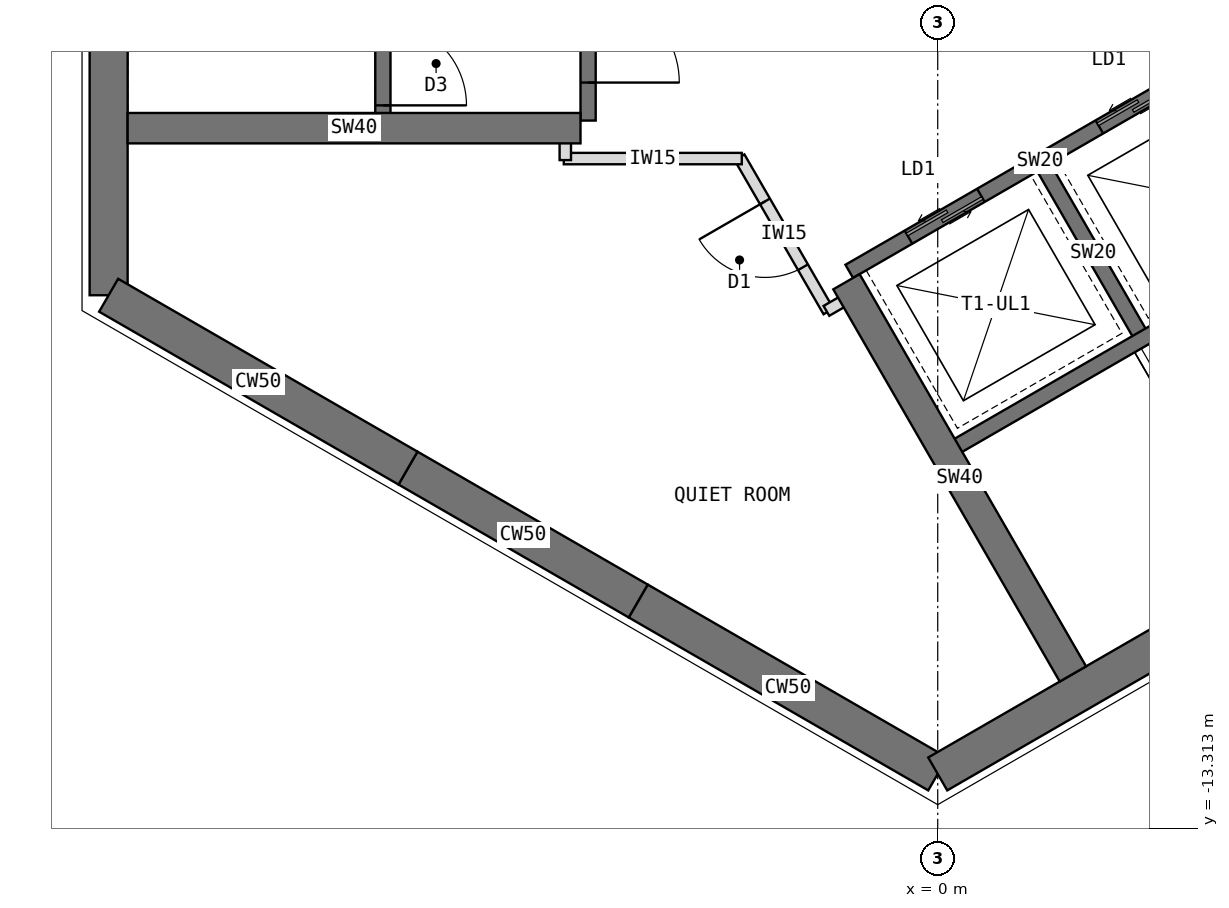
"""IFC4 building model, lengths in metres.
Left out: names, types, materials, properties, quantities, classifications, styles, units other than length and angle.
Written with IfcOpenShell. Run it as: python <this file> out.ifc"""

import sys

from ifc_helpers import new_model, si_unit, direction, frame, frame_2d, origin, place, context, subcontext, project, spatial, rectangle, extrude, element, fill, save


model = new_model("IFC4")
c1 = context("Model", 3, precision=1e-05, world=origin(), true_north=direction((0.0, 1.0)))
c2 = subcontext(c1, "Body", "Model", "MODEL_VIEW")
j1 = project(units=[si_unit("LENGTHUNIT", "METRE"), si_unit("PLANEANGLEUNIT", "RADIAN")], contexts=[c1])
p1 = place(None, origin())
s1 = spatial("IfcSite", under=j1, at=p1, CompositionType="ELEMENT")
p2 = place(p1, origin())
s2 = spatial("IfcBuilding", under=s1, at=p2, CompositionType="ELEMENT")
p3 = place(p2, frame((0.0, 0.0, 234.5)))
s3 = spatial("IfcBuildingStorey", under=s2, at=p3, CompositionType="ELEMENT", Elevation=234.5)
p4 = place(p3, frame((-10.908, 6.298, 0.0), z_axis=(0.0, 0.0, 1.0), x_axis=(0.0, -1.0, 0.0)))
e1 = element("IfcWall", 1, at=p4, inside=s3, PredefinedType="SHEAR", context=c2, shape_type="SweptSolid", body=[
    extrude(rectangle(XDim=12.596, YDim=0.5, at=frame_2d((6.298, 0.0))), origin(), (0.0, 0.0, 1.0), 4.0),
])
p5 = place(p3, frame((-10.908, -6.298, 0.0), z_axis=(0.0, 0.0, 1.0), x_axis=(0.866034513004, -0.499984222037, 0.0)))
e2 = element("IfcWall", 2, at=p5, inside=s3, PredefinedType="SHEAR", context=c2, shape_type="SweptSolid", body=[
    extrude(rectangle(XDim=4.548, YDim=0.5, at=frame_2d((2.274, 0.0))), origin(), (0.0, 0.0, 1.0), 4.0),
])
p6 = place(p3, frame((-6.97, -8.572, 0.0), z_axis=(0.0, 0.0, 1.0), x_axis=(0.866019471182, -0.500010275428, 0.0)))
e3 = element("IfcWall", 3, at=p6, inside=s3, PredefinedType="SHEAR", context=c2, shape_type="SweptSolid", body=[
    extrude(rectangle(XDim=3.5, YDim=0.5, at=frame_2d((1.75, 0.0))), origin(), (0.0, 0.0, 1.0), 4.0),
])
p7 = place(p3, frame((-3.939, -10.322, 0.0), z_axis=(0.0, 0.0, 1.0), x_axis=(0.866011268655, -0.500024481964, 0.0)))
e4 = element("IfcWall", 4, at=p7, inside=s3, PredefinedType="SHEAR", context=c2, shape_type="SweptSolid", body=[
    extrude(rectangle(XDim=4.548, YDim=0.5, at=frame_2d((2.274, 0.0))), origin(), (0.0, 0.0, 1.0), 4.0),
])
p8 = place(p3, frame((0.0, -12.596, 0.0), z_axis=(0.0, 0.0, 1.0), x_axis=(0.866021940709, 0.500005998175, 0.0)))
e5 = element("IfcWall", 5, at=p8, inside=s3, PredefinedType="SHEAR", context=c2, shape_type="SweptSolid", body=[
    extrude(rectangle(XDim=12.596, YDim=0.5, at=frame_2d((6.298, 0.0))), origin(), (0.0, 0.0, 1.0), 4.0),
])
p9 = place(p3, frame((-4.6, 4.0, 0.0), z_axis=(0.0, 0.0, 1.0), x_axis=(0.0, -1.0, 0.0)))
e6 = element("IfcWall", 6, at=p9, inside=s3, PredefinedType="SHEAR", context=c2, shape_type="SweptSolid", body=[
    extrude(rectangle(XDim=8.0, YDim=0.2, at=frame_2d((4.0, 0.0))), origin(), (0.0, 0.0, 1.0), 4.0),
])
p10 = place(p9, frame((6.3, 0.0, 0.0)))
e7 = element("IfcOpeningElement", 7, at=p10, cuts=e6, PredefinedType="OPENING", context=c2, shape_type="SweptSolid", body=[
    extrude(rectangle(XDim=1.2, YDim=2.1, at=frame_2d((0.6, 1.05))), frame((0.0, 0.11, 0.0), z_axis=(0.0, -1.0, 0.0), x_axis=(1.0, 0.0, 0.0)), (0.0, 0.0, 1.0), 0.22),
])
p11 = place(p9, frame((0.9, 0.0, 0.0)))
e8 = element("IfcOpeningElement", 8, at=p11, cuts=e6, PredefinedType="OPENING", context=c2, shape_type="SweptSolid", body=[
    extrude(rectangle(XDim=1.1, YDim=2.2, at=frame_2d((0.55, 1.1))), frame((0.0, 0.11, 0.0), z_axis=(0.0, -1.0, 0.0), x_axis=(1.0, 0.0, 0.0)), (0.0, 0.0, 1.0), 0.22),
])
p12 = place(p3, frame((-7.3, 4.0, 0.0), z_axis=(0.0, 0.0, 1.0), x_axis=(0.0, -1.0, 0.0)))
e9 = element("IfcWall", 9, at=p12, inside=s3, PredefinedType="SHEAR", context=c2, shape_type="SweptSolid", body=[
    extrude(rectangle(XDim=8.0, YDim=0.2, at=frame_2d((4.0, 0.0))), origin(), (0.0, 0.0, 1.0), 4.0),
])
p13 = place(p12, frame((6.7, 0.0, 0.0)))
e10 = element("IfcOpeningElement", 10, at=p13, cuts=e9, PredefinedType="OPENING", context=c2, shape_type="SweptSolid", body=[
    extrude(rectangle(XDim=1.1, YDim=2.1, at=frame_2d((0.55, 1.05))), frame((0.0, 0.11, 0.0), z_axis=(0.0, -1.0, 0.0), x_axis=(1.0, 0.0, 0.0)), (0.0, 0.0, 1.0), 0.22),
])
p14 = place(p3, frame((-4.7, -4.1, 0.0), z_axis=(0.0, 0.0, 1.0), x_axis=(-1.0, 0.0, 0.0)))
e11 = element("IfcWall", 11, at=p14, inside=s3, PredefinedType="SHEAR", context=c2, shape_type="SweptSolid", body=[
    extrude(rectangle(XDim=5.958, YDim=0.4, at=frame_2d((2.979, 0.0))), origin(), (0.0, 0.0, 1.0), 4.0),
])
p15 = place(p3, frame((-1.164, -5.984, 0.0), z_axis=(0.0, 0.0, 1.0), x_axis=(0.866026010844, 0.49999894854, 0.0)))
e12 = element("IfcWall", 12, at=p15, inside=s3, PredefinedType="SHEAR", context=c2, shape_type="SweptSolid", body=[
    extrude(rectangle(XDim=8.0, YDim=0.2, at=frame_2d((4.0, 0.0))), origin(), (0.0, 0.0, 1.0), 4.0),
])
p16 = place(p15, frame((6.3, 0.0, 0.0)))
e13 = element("IfcOpeningElement", 13, at=p16, cuts=e12, PredefinedType="OPENING", context=c2, shape_type="SweptSolid", body=[
    extrude(rectangle(XDim=1.2, YDim=2.1, at=frame_2d((0.6, 1.05))), frame((0.0, 0.11, 0.0), z_axis=(0.0, -1.0, 0.0), x_axis=(1.0, 0.0, 0.0)), (0.0, 0.0, 1.0), 0.22),
])
p17 = place(p15, frame((0.9, 0.0, 0.0)))
e14 = element("IfcOpeningElement", 14, at=p17, cuts=e12, PredefinedType="OPENING", context=c2, shape_type="SweptSolid", body=[
    extrude(rectangle(XDim=1.1, YDim=2.2, at=frame_2d((0.55, 1.1))), frame((0.0, 0.11, 0.0), z_axis=(0.0, -1.0, 0.0), x_axis=(1.0, 0.0, 0.0)), (0.0, 0.0, 1.0), 0.22),
])
p18 = place(p15, frame((3.8, 0.0, 0.0)))
e15 = element("IfcOpeningElement", 15, at=p18, cuts=e12, PredefinedType="OPENING", context=c2, shape_type="SweptSolid", body=[
    extrude(rectangle(XDim=1.1, YDim=2.2, at=frame_2d((0.55, 1.1))), frame((0.0, 0.11, 0.0), z_axis=(0.0, -1.0, 0.0), x_axis=(1.0, 0.0, 0.0)), (0.0, 0.0, 1.0), 0.22),
])
p19 = place(p3, frame((1.397, -4.62, 0.0), z_axis=(0.0, 0.0, 1.0), x_axis=(0.499936506574, -0.866062058628, 0.0)))
e16 = element("IfcWall", 16, at=p19, inside=s3, PredefinedType="SHEAR", context=c2, shape_type="SweptSolid", body=[
    extrude(rectangle(XDim=2.6, YDim=0.2, at=frame_2d((1.3, 0.0))), origin(), (0.0, 0.0, 1.0), 4.0),
])
p20 = place(p3, frame((0.186, -8.322, 0.0), z_axis=(0.0, 0.0, 1.0), x_axis=(0.866026010844, 0.49999894854, 0.0)))
e17 = element("IfcWall", 17, at=p20, inside=s3, PredefinedType="SHEAR", context=c2, shape_type="SweptSolid", body=[
    extrude(rectangle(XDim=8.0, YDim=0.2, at=frame_2d((4.0, 0.0))), origin(), (0.0, 0.0, 1.0), 4.0),
])
p21 = place(p20, frame((6.7, 0.0, 0.0)))
e18 = element("IfcOpeningElement", 18, at=p21, cuts=e17, PredefinedType="OPENING", context=c2, shape_type="SweptSolid", body=[
    extrude(rectangle(XDim=1.1, YDim=2.1, at=frame_2d((0.55, 1.05))), frame((0.0, 0.11, 0.0), z_axis=(0.0, -1.0, 0.0), x_axis=(1.0, 0.0, 0.0)), (0.0, 0.0, 1.0), 0.22),
])
p22 = place(p3, frame((-1.201, -6.12, 0.0), z_axis=(0.0, 0.0, 1.0), x_axis=(0.500021575205, -0.866012946976, 0.0)))
e19 = element("IfcWall", 19, at=p22, inside=s3, PredefinedType="SHEAR", context=c2, shape_type="SweptSolid", body=[
    extrude(rectangle(XDim=5.958, YDim=0.4, at=frame_2d((2.979, 0.0))), origin(), (0.0, 0.0, 1.0), 4.0),
])
p23 = place(p3, frame((-1.437, -6.511, 0.0), z_axis=(0.0, 0.0, 1.0), x_axis=(-0.500074377092, 0.865982457891, 0.0)))
e20 = element("IfcWall", 20, at=p23, inside=s3, PredefinedType="PARTITIONING", context=c2, shape_type="SweptSolid", body=[
    extrude(rectangle(XDim=2.342, YDim=0.15, at=frame_2d((1.171, 0.0))), origin(), (0.0, 0.0, 1.0), 3.7),
])
p24 = place(p23, frame((0.671, 0.0, 0.0)))
e21 = element("IfcOpeningElement", 21, at=p24, cuts=e20, PredefinedType="OPENING", context=c2, shape_type="SweptSolid", body=[
    extrude(rectangle(XDim=1.0, YDim=2.1, at=frame_2d((0.5, 1.05))), frame((0.0, 0.085, 0.0), z_axis=(0.0, -1.0, 0.0), x_axis=(1.0, 0.0, 0.0)), (0.0, 0.0, 1.0), 0.17),
])
p25 = place(p3, frame((-2.578, -4.5, 0.0), z_axis=(0.0, 0.0, 1.0), x_axis=(-1.0, 0.0, 0.0)))
e22 = element("IfcWall", 22, at=p25, inside=s3, PredefinedType="PARTITIONING", context=c2, shape_type="SweptSolid", body=[
    extrude(rectangle(XDim=2.342, YDim=0.15, at=frame_2d((1.171, 0.0))), origin(), (0.0, 0.0, 1.0), 3.7),
])
for number, where, z_axis, x_axis in (
    (23, (-4.9, -4.52, 0.0), (0.0, 0.0, 1.0), (0.0, 1.0, 0.0)),
    (24, (-1.092, -6.289, 0.0), (0.0, 0.0, 1.0), (-0.866, -0.5, 0.0)),
):
    element("IfcWall", number, at=place(p3, frame(where, z_axis=z_axis, x_axis=x_axis)), inside=s3, PredefinedType="PARTITIONING", context=c2, shape_type="SweptSolid", body=[
        extrude(rectangle(XDim=0.43, YDim=0.15, at=frame_2d((0.215, 0.0))), origin(), (0.0, 0.0, 1.0), 3.7),
    ])
p26 = place(p10, origin())
e25 = element("IfcDoor", 25, at=p26, inside=s3, OperationType="SINGLE_SWING_RIGHT", PredefinedType="DOOR", context=c2, shape_type="SweptSolid", body=[
    extrude(rectangle(XDim=1.2, YDim=2.1, at=frame_2d((0.6, 1.05))), frame((0.0, 0.025, 0.0), z_axis=(0.0, -1.0, 0.0), x_axis=(1.0, 0.0, 0.0)), (0.0, 0.0, 1.0), 0.05),
])
fill(e7, e25)
p27 = place(p13, origin())
e26 = element("IfcDoor", 26, at=p27, inside=s3, OperationType="SINGLE_SWING_RIGHT", PredefinedType="DOOR", context=c2, shape_type="SweptSolid", body=[
    extrude(rectangle(XDim=1.1, YDim=2.1, at=frame_2d((0.55, 1.05))), frame((0.0, 0.025, 0.0), z_axis=(0.0, -1.0, 0.0), x_axis=(1.0, 0.0, 0.0)), (0.0, 0.0, 1.0), 0.05),
])
fill(e10, e26)
p28 = place(p17, origin())
e27 = element("IfcDoor", 27, at=p28, inside=s3, OperationType="DOUBLE_DOOR_SLIDING", PredefinedType="DOOR", context=c2, shape_type="SweptSolid", body=[
    extrude(rectangle(XDim=1.1, YDim=2.2, at=frame_2d((0.55, 1.1))), frame((0.0, 0.025, 0.0), z_axis=(0.0, -1.0, 0.0), x_axis=(1.0, 0.0, 0.0)), (0.0, 0.0, 1.0), 0.05),
])
fill(e14, e27)
p29 = place(p18, origin())
e28 = element("IfcDoor", 28, at=p29, inside=s3, OperationType="DOUBLE_DOOR_SLIDING", PredefinedType="DOOR", context=c2, shape_type="SweptSolid", body=[
    extrude(rectangle(XDim=1.1, YDim=2.2, at=frame_2d((0.55, 1.1))), frame((0.0, 0.025, 0.0), z_axis=(0.0, -1.0, 0.0), x_axis=(1.0, 0.0, 0.0)), (0.0, 0.0, 1.0), 0.05),
])
fill(e15, e28)
p30 = place(p24, origin())
e29 = element("IfcDoor", 29, at=p30, inside=s3, OperationType="SINGLE_SWING_RIGHT", PredefinedType="DOOR", context=c2, shape_type="SweptSolid", body=[
    extrude(rectangle(XDim=1.0, YDim=2.1, at=frame_2d((0.5, 1.05))), frame((0.0, 0.025, 0.0), z_axis=(0.0, -1.0, 0.0), x_axis=(1.0, 0.0, 0.0)), (0.0, 0.0, 1.0), 0.05),
])
fill(e21, e29)
save(model, sys.argv[1])
